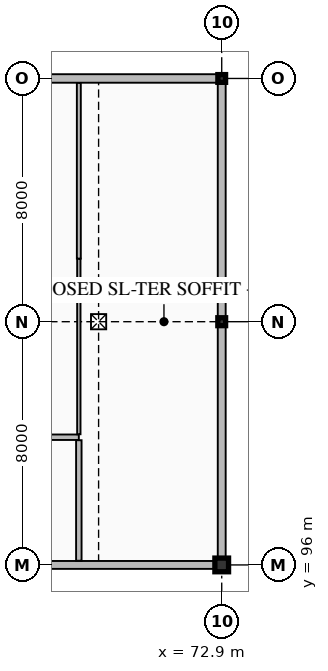
"""IFC4 building model, lengths in metres.
Left out: names, types, materials, properties, quantities, classifications, styles, units other than length and angle.
Written with IfcOpenShell. Run it as: python <this file> out.ifc"""

import sys

from ifc_helpers import new_model, si_unit, direction, frame, frame_2d, origin, origin_2d, place, context, subcontext, project, spatial, rectangle, hollow_rectangle, i_section, extrude, element, fill, save


model = new_model("IFC4")
c1 = context("Model", 3, precision=1e-05, world=origin(), true_north=direction((0.0, 1.0)))
c2 = subcontext(c1, "Body", "Model", "MODEL_VIEW")
j1 = project(units=[si_unit("LENGTHUNIT", "METRE"), si_unit("PLANEANGLEUNIT", "RADIAN")], contexts=[c1])
p1 = place(None, origin())
s1 = spatial("IfcSite", under=j1, at=p1, CompositionType="ELEMENT")
p2 = place(p1, origin())
s2 = spatial("IfcBuilding", under=s1, at=p2, CompositionType="ELEMENT")
p3 = place(p2, frame((0.0, 0.0, 29.1)))
s3 = spatial("IfcBuildingStorey", under=s2, at=p3, CompositionType="ELEMENT", Elevation=29.1)
p4 = place(p3, frame((72.9, 96.0, 0.0), z_axis=(0.0, 0.0, 1.0), x_axis=(1.0, 0.0, 0.0)))
e1 = element("IfcColumn", 1, at=p4, inside=s3, PredefinedType="COLUMN", context=c2, shape_type="SweptSolid", body=[
    extrude(rectangle(XDim=0.45, YDim=0.45, at=origin_2d()), origin(), (0.0, 0.0, 1.0), 3.86),
])
p5 = place(p3, frame((72.9, 104.0, 0.0), z_axis=(0.0, 0.0, 1.0), x_axis=(1.0, 0.0, 0.0)))
e2 = element("IfcColumn", 2, at=p5, inside=s3, PredefinedType="COLUMN", context=c2, shape_type="SweptSolid", body=[
    extrude(i_section(OverallWidth=0.256, OverallDepth=0.26, WebThickness=0.011, FlangeThickness=0.017, FilletRadius=0.013, at=origin_2d()), origin(), (0.0, 0.0, 1.0), 3.86),
])
p6 = place(p3, frame((72.9, 112.0, 0.0), z_axis=(0.0, 0.0, 1.0), x_axis=(1.0, 0.0, 0.0)))
e3 = element("IfcColumn", 3, at=p6, inside=s3, PredefinedType="COLUMN", context=c2, shape_type="SweptSolid", body=[
    extrude(hollow_rectangle(XDim=0.254, YDim=0.254, WallThickness=0.013, InnerFilletRadius=0.013, OuterFilletRadius=0.025, at=origin_2d()), origin(), (0.0, 0.0, 1.0), 3.86),
])
p7 = place(p3, frame((56.79, 96.0, 0.0), z_axis=(0.0, 0.0, 1.0), x_axis=(1.0, 0.0, 0.0)))
e4 = element("IfcWall", 4, at=p7, inside=s3, PredefinedType="SOLIDWALL", context=c2, shape_type="SweptSolid", body=[
    extrude(rectangle(XDim=16.11, YDim=0.26, at=frame_2d((8.055, 0.0))), origin(), (0.0, 0.0, 1.0), 3.302),
])
p8 = place(p3, frame((72.9, 96.0, 0.0), z_axis=(0.0, 0.0, 1.0), x_axis=(0.0, 1.0, 0.0)))
e5 = element("IfcWall", 5, at=p8, inside=s3, PredefinedType="SOLIDWALL", context=c2, shape_type="SweptSolid", body=[
    extrude(rectangle(XDim=16.0, YDim=0.26, at=frame_2d((8.0, 0.0))), origin(), (0.0, 0.0, 1.0), 3.389),
])
p9 = place(p8, frame((11.375, 0.0, 0.0)))
e6 = element("IfcOpeningElement", 6, at=p9, cuts=e5, PredefinedType="OPENING", context=c2, shape_type="SweptSolid", body=[
    extrude(rectangle(XDim=1.25, YDim=2.25, at=frame_2d((0.625, 1.125))), frame((0.0, 0.14, 0.0), z_axis=(0.0, -1.0, 0.0), x_axis=(1.0, 0.0, 0.0)), (0.0, 0.0, 1.0), 0.28),
])
p10 = place(p3, frame((72.9, 112.0, 0.0), z_axis=(0.0, 0.0, 1.0), x_axis=(-1.0, 0.0, 0.0)))
e7 = element("IfcWall", 7, at=p10, inside=s3, PredefinedType="SOLIDWALL", context=c2, shape_type="SweptSolid", body=[
    extrude(rectangle(XDim=10.8, YDim=0.28, at=frame_2d((5.4, 0.0))), origin(), (0.0, 0.0, 1.0), 3.302),
])
p11 = place(p3, frame((64.6, 100.2, 0.0), z_axis=(0.0, 0.0, 1.0), x_axis=(1.0, 0.0, 0.0)))
e8 = element("IfcWall", 8, at=p11, inside=s3, PredefinedType="PARTITIONING", context=c2, shape_type="SweptSolid", body=[
    extrude(rectangle(XDim=3.6, YDim=0.18, at=frame_2d((1.8, 0.0))), origin(), (0.0, 0.0, 1.0), 3.96),
])
p12 = place(p11, frame((1.3, 0.0, 0.0)))
e9 = element("IfcOpeningElement", 9, at=p12, cuts=e8, PredefinedType="OPENING", context=c2, shape_type="SweptSolid", body=[
    extrude(rectangle(XDim=1.0, YDim=2.2, at=frame_2d((0.5, 1.1))), frame((0.0, 0.1, 0.0), z_axis=(0.0, -1.0, 0.0), x_axis=(1.0, 0.0, 0.0)), (0.0, 0.0, 1.0), 0.2),
])
p13 = place(p3, frame((68.2, 96.138, 0.0), z_axis=(0.0, 0.0, 1.0), x_axis=(0.0, 1.0, 0.0)))
e10 = element("IfcWall", 10, at=p13, inside=s3, PredefinedType="PARTITIONING", context=c2, shape_type="SweptSolid", body=[
    extrude(rectangle(XDim=3.964, YDim=0.18, at=frame_2d((1.982, 0.0))), origin(), (0.0, 0.0, 1.0), 3.96),
])
p14 = place(p13, frame((1.482, 0.0, 0.0)))
e11 = element("IfcOpeningElement", 11, at=p14, cuts=e10, PredefinedType="OPENING", context=c2, shape_type="SweptSolid", body=[
    extrude(rectangle(XDim=1.0, YDim=2.2, at=frame_2d((0.5, 1.1))), frame((0.0, 0.1, 0.0), z_axis=(0.0, -1.0, 0.0), x_axis=(1.0, 0.0, 0.0)), (0.0, 0.0, 1.0), 0.2),
])
p15 = place(p3, frame((68.2, 100.298, 0.0), z_axis=(0.0, 0.0, 1.0), x_axis=(0.0, 1.0, 0.0)))
e12 = element("IfcWall", 12, at=p15, inside=s3, PredefinedType="PARTITIONING", context=c2, shape_type="SweptSolid", body=[
    extrude(rectangle(XDim=5.777, YDim=0.11, at=frame_2d((2.888, 0.0))), origin(), (0.0, 0.0, 1.0), 3.96),
])
p16 = place(p3, frame((68.2, 106.075, 0.0), z_axis=(0.0, 0.0, 1.0), x_axis=(0.0, 1.0, 0.0)))
e13 = element("IfcWall", 13, at=p16, inside=s3, PredefinedType="PARTITIONING", context=c2, shape_type="SweptSolid", body=[
    extrude(rectangle(XDim=5.777, YDim=0.13, at=frame_2d((2.889, 0.0))), origin(), (0.0, 0.0, 1.0), 3.96),
])
p17 = place(p9, frame((1.25, 0.0, 0.0), z_axis=(0.0, 0.0, 1.0), x_axis=(-1.0, 0.0, 0.0)))
e14 = element("IfcDoor", 14, at=p17, inside=s3, OperationType="SINGLE_SWING_LEFT", PredefinedType="DOOR", context=c2, shape_type="SweptSolid", body=[
    extrude(rectangle(XDim=1.25, YDim=2.25, at=frame_2d((0.625, 1.125))), frame((0.0, 0.025, 0.0), z_axis=(0.0, -1.0, 0.0), x_axis=(1.0, 0.0, 0.0)), (0.0, 0.0, 1.0), 0.05),
])
fill(e6, e14)
p18 = place(p14, frame((1.0, 0.0, 0.0), z_axis=(0.0, 0.0, 1.0), x_axis=(-1.0, 0.0, 0.0)))
e15 = element("IfcDoor", 15, at=p18, inside=s3, OperationType="SINGLE_SWING_LEFT", PredefinedType="DOOR", context=c2, shape_type="SweptSolid", body=[
    extrude(rectangle(XDim=1.0, YDim=2.2, at=frame_2d((0.5, 1.1))), frame((0.0, 0.025, 0.0), z_axis=(0.0, -1.0, 0.0), x_axis=(1.0, 0.0, 0.0)), (0.0, 0.0, 1.0), 0.05),
])
fill(e11, e15)
save(model, sys.argv[1])
